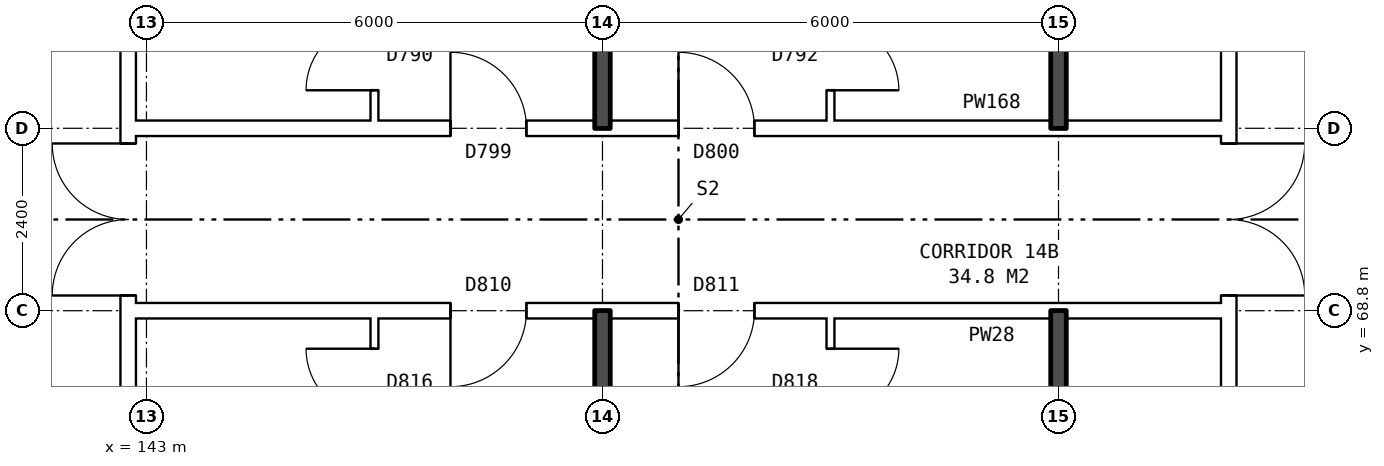
"""IFC4 building model, lengths in metres.
Left out: names, types, materials, properties, quantities, classifications, styles, units other than length and angle.
Written with IfcOpenShell. Run it as: python <this file> out.ifc"""

import sys

from ifc_helpers import new_model, si_unit, direction, frame, frame_2d, origin, place, context, subcontext, project, spatial, rectangle, extrude, element, fill, save


model = new_model("IFC4")
c1 = context("Model", 3, precision=1e-05, world=origin(), true_north=direction((0.0, 1.0)))
c2 = subcontext(c1, "Body", "Model", "MODEL_VIEW")
j1 = project(units=[si_unit("LENGTHUNIT", "METRE"), si_unit("PLANEANGLEUNIT", "RADIAN")], contexts=[c1])
p1 = place(None, origin())
s1 = spatial("IfcSite", under=j1, at=p1, CompositionType="ELEMENT")
p2 = place(p1, origin())
s2 = spatial("IfcBuilding", under=s1, at=p2, CompositionType="ELEMENT")
p3 = place(p2, frame((0.0, 0.0, 53.6)))
s3 = spatial("IfcBuildingStorey", under=s2, at=p3, CompositionType="ELEMENT", Elevation=53.6)
p4 = place(p3, frame((142.76, 63.9, 0.0), z_axis=(0.0, 0.0, 1.0), x_axis=(0.0, 1.0, 0.0)))
e1 = element("IfcWall", 1, at=p4, inside=s3, PredefinedType="PARTITIONING", context=c2, shape_type="SweptSolid", body=[
    extrude(rectangle(XDim=12.2, YDim=0.2, at=frame_2d((6.1, 0.0))), origin(), (0.0, 0.0, 1.0), 2.85),
])
p5 = place(p4, frame((5.1, 0.0, 0.0)))
e2 = element("IfcOpeningElement", 2, at=p5, cuts=e1, PredefinedType="OPENING", context=c2, shape_type="SweptSolid", body=[
    extrude(rectangle(XDim=2.0, YDim=2.1, at=frame_2d((1.0, 1.05))), frame((0.0, 0.11, 0.0), z_axis=(0.0, -1.0, 0.0), x_axis=(1.0, 0.0, 0.0)), (0.0, 0.0, 1.0), 0.22),
])
p6 = place(p3, frame((157.24, 63.9, 0.0), z_axis=(0.0, 0.0, 1.0), x_axis=(0.0, 1.0, 0.0)))
e3 = element("IfcWall", 3, at=p6, inside=s3, PredefinedType="PARTITIONING", context=c2, shape_type="SweptSolid", body=[
    extrude(rectangle(XDim=12.2, YDim=0.2, at=frame_2d((6.1, 0.0))), origin(), (0.0, 0.0, 1.0), 2.85),
])
p7 = place(p6, frame((5.1, 0.0, 0.0)))
e4 = element("IfcOpeningElement", 4, at=p7, cuts=e3, PredefinedType="OPENING", context=c2, shape_type="SweptSolid", body=[
    extrude(rectangle(XDim=2.0, YDim=2.1, at=frame_2d((1.0, 1.05))), frame((0.0, 0.11, 0.0), z_axis=(0.0, -1.0, 0.0), x_axis=(1.0, 0.0, 0.0)), (0.0, 0.0, 1.0), 0.22),
])
p8 = place(p3, frame((142.76, 68.8, 0.0), z_axis=(0.0, 0.0, 1.0), x_axis=(1.0, 0.0, 0.0)))
e5 = element("IfcWall", 5, at=p8, inside=s3, PredefinedType="PARTITIONING", context=c2, shape_type="SweptSolid", body=[
    extrude(rectangle(XDim=14.48, YDim=0.2, at=frame_2d((7.24, 0.0))), origin(), (0.0, 0.0, 1.0), 2.85),
])
p9 = place(p8, frame((4.24, 0.0, 0.0)))
e6 = element("IfcOpeningElement", 6, at=p9, cuts=e5, PredefinedType="OPENING", context=c2, shape_type="SweptSolid", body=[
    extrude(rectangle(XDim=1.0, YDim=2.1, at=frame_2d((0.5, 1.05))), frame((0.0, 0.11, 0.0), z_axis=(0.0, -1.0, 0.0), x_axis=(1.0, 0.0, 0.0)), (0.0, 0.0, 1.0), 0.22),
])
p10 = place(p8, frame((7.24, 0.0, 0.0)))
e7 = element("IfcOpeningElement", 7, at=p10, cuts=e5, PredefinedType="OPENING", context=c2, shape_type="SweptSolid", body=[
    extrude(rectangle(XDim=1.0, YDim=2.1, at=frame_2d((0.5, 1.05))), frame((0.0, 0.11, 0.0), z_axis=(0.0, -1.0, 0.0), x_axis=(1.0, 0.0, 0.0)), (0.0, 0.0, 1.0), 0.22),
])
p11 = place(p3, frame((142.76, 71.2, 0.0), z_axis=(0.0, 0.0, 1.0), x_axis=(1.0, 0.0, 0.0)))
e8 = element("IfcWall", 8, at=p11, inside=s3, PredefinedType="PARTITIONING", context=c2, shape_type="SweptSolid", body=[
    extrude(rectangle(XDim=14.48, YDim=0.2, at=frame_2d((7.24, 0.0))), origin(), (0.0, 0.0, 1.0), 2.85),
])
p12 = place(p11, frame((4.24, 0.0, 0.0)))
e9 = element("IfcOpeningElement", 9, at=p12, cuts=e8, PredefinedType="OPENING", context=c2, shape_type="SweptSolid", body=[
    extrude(rectangle(XDim=1.0, YDim=2.1, at=frame_2d((0.5, 1.05))), frame((0.0, 0.11, 0.0), z_axis=(0.0, -1.0, 0.0), x_axis=(1.0, 0.0, 0.0)), (0.0, 0.0, 1.0), 0.22),
])
p13 = place(p11, frame((7.24, 0.0, 0.0)))
e10 = element("IfcOpeningElement", 10, at=p13, cuts=e8, PredefinedType="OPENING", context=c2, shape_type="SweptSolid", body=[
    extrude(rectangle(XDim=1.0, YDim=2.1, at=frame_2d((0.5, 1.05))), frame((0.0, 0.11, 0.0), z_axis=(0.0, -1.0, 0.0), x_axis=(1.0, 0.0, 0.0)), (0.0, 0.0, 1.0), 0.22),
])
p14 = place(p3, frame((146.0, 54.36, 0.0), z_axis=(0.0, 0.0, 1.0), x_axis=(0.0, 1.0, 0.0)))
e11 = element("IfcWall", 11, at=p14, inside=s3, PredefinedType="PARTITIONING", context=c2, shape_type="SweptSolid", body=[
    extrude(rectangle(XDim=14.34, YDim=0.1, at=frame_2d((7.17, 0.0))), origin(), (0.0, 0.0, 1.0), 2.85),
])
p15 = place(p14, frame((4.2, 0.0, 0.0)))
e12 = element("IfcOpeningElement", 12, at=p15, cuts=e11, PredefinedType="OPENING", context=c2, shape_type="SweptSolid", body=[
    extrude(rectangle(XDim=0.9, YDim=2.1, at=frame_2d((0.45, 1.05))), frame((0.0, 0.06, 0.0), z_axis=(0.0, -1.0, 0.0), x_axis=(1.0, 0.0, 0.0)), (0.0, 0.0, 1.0), 0.12),
])
p16 = place(p14, frame((13.04, 0.0, 0.0)))
e13 = element("IfcOpeningElement", 13, at=p16, cuts=e11, PredefinedType="OPENING", context=c2, shape_type="SweptSolid", body=[
    extrude(rectangle(XDim=0.9, YDim=2.1, at=frame_2d((0.45, 1.05))), frame((0.0, 0.06, 0.0), z_axis=(0.0, -1.0, 0.0), x_axis=(1.0, 0.0, 0.0)), (0.0, 0.0, 1.0), 0.12),
])
p17 = place(p3, frame((146.0, 71.3, 0.0), z_axis=(0.0, 0.0, 1.0), x_axis=(0.0, 1.0, 0.0)))
e14 = element("IfcWall", 14, at=p17, inside=s3, PredefinedType="PARTITIONING", context=c2, shape_type="SweptSolid", body=[
    extrude(rectangle(XDim=14.34, YDim=0.1, at=frame_2d((7.17, 0.0))), origin(), (0.0, 0.0, 1.0), 2.85),
])
p18 = place(p17, frame((9.24, 0.0, 0.0)))
e15 = element("IfcOpeningElement", 15, at=p18, cuts=e14, PredefinedType="OPENING", context=c2, shape_type="SweptSolid", body=[
    extrude(rectangle(XDim=0.9, YDim=2.1, at=frame_2d((0.45, 1.05))), frame((0.0, 0.06, 0.0), z_axis=(0.0, -1.0, 0.0), x_axis=(1.0, 0.0, 0.0)), (0.0, 0.0, 1.0), 0.12),
])
p19 = place(p17, frame((0.4, 0.0, 0.0)))
e16 = element("IfcOpeningElement", 16, at=p19, cuts=e14, PredefinedType="OPENING", context=c2, shape_type="SweptSolid", body=[
    extrude(rectangle(XDim=0.9, YDim=2.1, at=frame_2d((0.45, 1.05))), frame((0.0, 0.06, 0.0), z_axis=(0.0, -1.0, 0.0), x_axis=(1.0, 0.0, 0.0)), (0.0, 0.0, 1.0), 0.12),
])
for number, where, z_axis, x_axis in (
    (17, (149.0, 54.36, 0.0), (0.0, 0.0, 1.0), (0.0, 1.0, 0.0)),
    (18, (149.0, 71.2, 0.0), (0.0, 0.0, 1.0), (0.0, 1.0, 0.0)),
):
    element("IfcWall", number, at=place(p3, frame(where, z_axis=z_axis, x_axis=x_axis)), inside=s3, PredefinedType="SOLIDWALL", context=c2, shape_type="SweptSolid", body=[
        extrude(rectangle(XDim=14.44, YDim=0.2, at=frame_2d((7.22, 0.0))), origin(), (0.0, 0.0, 1.0), 2.85),
    ])
p20 = place(p3, frame((152.0, 54.36, 0.0), z_axis=(0.0, 0.0, 1.0), x_axis=(0.0, 1.0, 0.0)))
e19 = element("IfcWall", 19, at=p20, inside=s3, PredefinedType="PARTITIONING", context=c2, shape_type="SweptSolid", body=[
    extrude(rectangle(XDim=14.34, YDim=0.1, at=frame_2d((7.17, 0.0))), origin(), (0.0, 0.0, 1.0), 2.85),
])
p21 = place(p20, frame((4.2, 0.0, 0.0)))
e20 = element("IfcOpeningElement", 20, at=p21, cuts=e19, PredefinedType="OPENING", context=c2, shape_type="SweptSolid", body=[
    extrude(rectangle(XDim=0.9, YDim=2.1, at=frame_2d((0.45, 1.05))), frame((0.0, 0.06, 0.0), z_axis=(0.0, -1.0, 0.0), x_axis=(1.0, 0.0, 0.0)), (0.0, 0.0, 1.0), 0.12),
])
p22 = place(p20, frame((13.04, 0.0, 0.0)))
e21 = element("IfcOpeningElement", 21, at=p22, cuts=e19, PredefinedType="OPENING", context=c2, shape_type="SweptSolid", body=[
    extrude(rectangle(XDim=0.9, YDim=2.1, at=frame_2d((0.45, 1.05))), frame((0.0, 0.06, 0.0), z_axis=(0.0, -1.0, 0.0), x_axis=(1.0, 0.0, 0.0)), (0.0, 0.0, 1.0), 0.12),
])
p23 = place(p3, frame((152.0, 71.3, 0.0), z_axis=(0.0, 0.0, 1.0), x_axis=(0.0, 1.0, 0.0)))
e22 = element("IfcWall", 22, at=p23, inside=s3, PredefinedType="PARTITIONING", context=c2, shape_type="SweptSolid", body=[
    extrude(rectangle(XDim=14.34, YDim=0.1, at=frame_2d((7.17, 0.0))), origin(), (0.0, 0.0, 1.0), 2.85),
])
p24 = place(p23, frame((6.74, 0.0, 0.0)))
e23 = element("IfcOpeningElement", 23, at=p24, cuts=e22, PredefinedType="OPENING", context=c2, shape_type="SweptSolid", body=[
    extrude(rectangle(XDim=0.9, YDim=2.1, at=frame_2d((0.45, 1.05))), frame((0.0, 0.06, 0.0), z_axis=(0.0, -1.0, 0.0), x_axis=(1.0, 0.0, 0.0)), (0.0, 0.0, 1.0), 0.12),
])
p25 = place(p23, frame((0.4, 0.0, 0.0)))
e24 = element("IfcOpeningElement", 24, at=p25, cuts=e22, PredefinedType="OPENING", context=c2, shape_type="SweptSolid", body=[
    extrude(rectangle(XDim=0.9, YDim=2.1, at=frame_2d((0.45, 1.05))), frame((0.0, 0.06, 0.0), z_axis=(0.0, -1.0, 0.0), x_axis=(1.0, 0.0, 0.0)), (0.0, 0.0, 1.0), 0.12),
])
for number, where, z_axis, x_axis in (
    (25, (155.0, 63.8, 0.0), (0.0, 0.0, 1.0), (0.0, 1.0, 0.0)),
    (26, (155.0, 71.2, 0.0), (0.0, 0.0, 1.0), (0.0, 1.0, 0.0)),
):
    element("IfcWall", number, at=place(p3, frame(where, z_axis=z_axis, x_axis=x_axis)), inside=s3, PredefinedType="SOLIDWALL", context=c2, shape_type="SweptSolid", body=[
        extrude(rectangle(XDim=5.0, YDim=0.2, at=frame_2d((2.5, 0.0))), origin(), (0.0, 0.0, 1.0), 2.85),
    ])
p26 = place(p5, origin())
e27 = element("IfcDoor", 27, at=p26, inside=s3, OperationType="DOUBLE_DOOR_SINGLE_SWING", PredefinedType="DOOR", context=c2, shape_type="SweptSolid", body=[
    extrude(rectangle(XDim=2.0, YDim=2.1, at=frame_2d((1.0, 1.05))), frame((0.0, 0.025, 0.0), z_axis=(0.0, -1.0, 0.0), x_axis=(1.0, 0.0, 0.0)), (0.0, 0.0, 1.0), 0.05),
])
fill(e2, e27)
p27 = place(p7, frame((2.0, 0.0, 0.0), z_axis=(0.0, 0.0, 1.0), x_axis=(-1.0, 0.0, 0.0)))
e28 = element("IfcDoor", 28, at=p27, inside=s3, OperationType="DOUBLE_DOOR_SINGLE_SWING", PredefinedType="DOOR", context=c2, shape_type="SweptSolid", body=[
    extrude(rectangle(XDim=2.0, YDim=2.1, at=frame_2d((1.0, 1.05))), frame((0.0, 0.025, 0.0), z_axis=(0.0, -1.0, 0.0), x_axis=(1.0, 0.0, 0.0)), (0.0, 0.0, 1.0), 0.05),
])
fill(e4, e28)
p28 = place(p9, frame((1.0, 0.0, 0.0), z_axis=(0.0, 0.0, 1.0), x_axis=(-1.0, 0.0, 0.0)))
e29 = element("IfcDoor", 29, at=p28, inside=s3, OperationType="SINGLE_SWING_RIGHT", PredefinedType="DOOR", context=c2, shape_type="SweptSolid", body=[
    extrude(rectangle(XDim=1.0, YDim=2.1, at=frame_2d((0.5, 1.05))), frame((0.0, 0.025, 0.0), z_axis=(0.0, -1.0, 0.0), x_axis=(1.0, 0.0, 0.0)), (0.0, 0.0, 1.0), 0.05),
])
fill(e6, e29)
p29 = place(p16, origin())
e30 = element("IfcDoor", 30, at=p29, inside=s3, OperationType="SINGLE_SWING_RIGHT", PredefinedType="DOOR", context=c2, shape_type="SweptSolid", body=[
    extrude(rectangle(XDim=0.9, YDim=2.1, at=frame_2d((0.45, 1.05))), frame((0.0, 0.025, 0.0), z_axis=(0.0, -1.0, 0.0), x_axis=(1.0, 0.0, 0.0)), (0.0, 0.0, 1.0), 0.05),
])
fill(e13, e30)
p30 = place(p10, frame((1.0, 0.0, 0.0), z_axis=(0.0, 0.0, 1.0), x_axis=(-1.0, 0.0, 0.0)))
e31 = element("IfcDoor", 31, at=p30, inside=s3, OperationType="SINGLE_SWING_RIGHT", PredefinedType="DOOR", context=c2, shape_type="SweptSolid", body=[
    extrude(rectangle(XDim=1.0, YDim=2.1, at=frame_2d((0.5, 1.05))), frame((0.0, 0.025, 0.0), z_axis=(0.0, -1.0, 0.0), x_axis=(1.0, 0.0, 0.0)), (0.0, 0.0, 1.0), 0.05),
])
fill(e7, e31)
p31 = place(p22, frame((0.9, 0.0, 0.0), z_axis=(0.0, 0.0, 1.0), x_axis=(-1.0, 0.0, 0.0)))
e32 = element("IfcDoor", 32, at=p31, inside=s3, OperationType="SINGLE_SWING_LEFT", PredefinedType="DOOR", context=c2, shape_type="SweptSolid", body=[
    extrude(rectangle(XDim=0.9, YDim=2.1, at=frame_2d((0.45, 1.05))), frame((0.0, 0.025, 0.0), z_axis=(0.0, -1.0, 0.0), x_axis=(1.0, 0.0, 0.0)), (0.0, 0.0, 1.0), 0.05),
])
fill(e21, e32)
p32 = place(p12, origin())
e33 = element("IfcDoor", 33, at=p32, inside=s3, OperationType="SINGLE_SWING_LEFT", PredefinedType="DOOR", context=c2, shape_type="SweptSolid", body=[
    extrude(rectangle(XDim=1.0, YDim=2.1, at=frame_2d((0.5, 1.05))), frame((0.0, 0.025, 0.0), z_axis=(0.0, -1.0, 0.0), x_axis=(1.0, 0.0, 0.0)), (0.0, 0.0, 1.0), 0.05),
])
fill(e9, e33)
p33 = place(p19, origin())
e34 = element("IfcDoor", 34, at=p33, inside=s3, OperationType="SINGLE_SWING_LEFT", PredefinedType="DOOR", context=c2, shape_type="SweptSolid", body=[
    extrude(rectangle(XDim=0.9, YDim=2.1, at=frame_2d((0.45, 1.05))), frame((0.0, 0.025, 0.0), z_axis=(0.0, -1.0, 0.0), x_axis=(1.0, 0.0, 0.0)), (0.0, 0.0, 1.0), 0.05),
])
fill(e16, e34)
p34 = place(p13, origin())
e35 = element("IfcDoor", 35, at=p34, inside=s3, OperationType="SINGLE_SWING_LEFT", PredefinedType="DOOR", context=c2, shape_type="SweptSolid", body=[
    extrude(rectangle(XDim=1.0, YDim=2.1, at=frame_2d((0.5, 1.05))), frame((0.0, 0.025, 0.0), z_axis=(0.0, -1.0, 0.0), x_axis=(1.0, 0.0, 0.0)), (0.0, 0.0, 1.0), 0.05),
])
fill(e10, e35)
p35 = place(p25, frame((0.9, 0.0, 0.0), z_axis=(0.0, 0.0, 1.0), x_axis=(-1.0, 0.0, 0.0)))
e36 = element("IfcDoor", 36, at=p35, inside=s3, OperationType="SINGLE_SWING_RIGHT", PredefinedType="DOOR", context=c2, shape_type="SweptSolid", body=[
    extrude(rectangle(XDim=0.9, YDim=2.1, at=frame_2d((0.45, 1.05))), frame((0.0, 0.025, 0.0), z_axis=(0.0, -1.0, 0.0), x_axis=(1.0, 0.0, 0.0)), (0.0, 0.0, 1.0), 0.05),
])
fill(e24, e36)
save(model, sys.argv[1])
